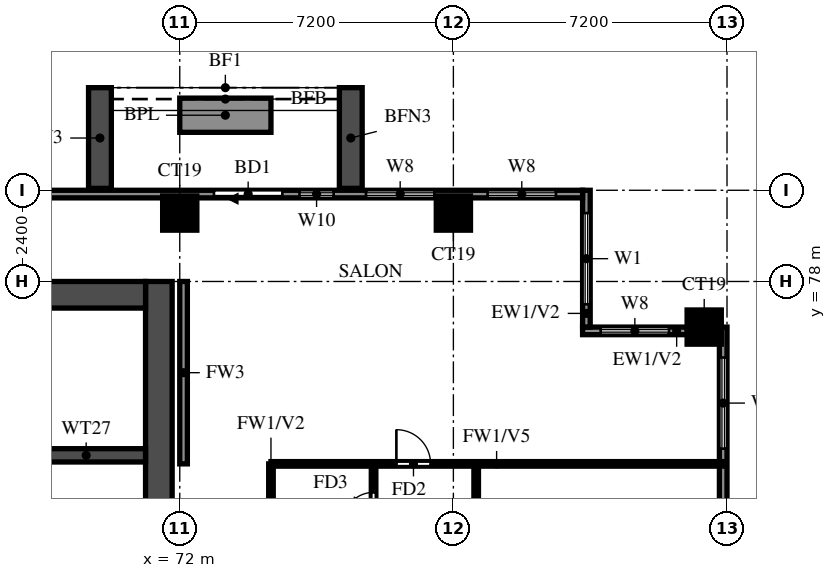
"""IFC4 building model, lengths in metres.
Left out: names, types, materials, properties, quantities, classifications, styles, units other than length and angle.
Written with IfcOpenShell. Run it as: python <this file> out.ifc"""

import sys

from ifc_helpers import new_model, si_unit, direction, frame, frame_2d, origin, origin_2d, place, context, subcontext, project, spatial, rectangle, extrude, source, transform, mapped, element, fill, save


model = new_model("IFC4")
c1 = context("Model", 3, precision=1e-05, world=origin(), true_north=direction((0.0, 1.0)))
c2 = subcontext(c1, "Body", "Model", "MODEL_VIEW")
j1 = project(units=[si_unit("LENGTHUNIT", "METRE"), si_unit("PLANEANGLEUNIT", "RADIAN")], contexts=[c1])
p1 = place(None, origin())
s1 = spatial("IfcSite", under=j1, at=p1, CompositionType="ELEMENT")
p2 = place(p1, origin())
s2 = spatial("IfcBuilding", under=s1, at=p2, CompositionType="ELEMENT")
p3 = place(p2, frame((0.0, 0.0, 120.0)))
s3 = spatial("IfcBuildingStorey", under=s2, at=p3, CompositionType="ELEMENT", Elevation=120.0)
m1 = source(origin(), c2, "Body", "SweptSolid", [
    extrude(rectangle(XDim=0.9, YDim=0.9, at=origin_2d()), origin(), (0.0, 0.0, 1.0), 3.2),
])
for number, where, z_axis, x_axis in (
    (1, (85.8, 76.8, 0.0), (0.0, 0.0, 1.0), (1.0, 0.0, 0.0)),
    (2, (72.0, 79.8, 0.0), (0.0, 0.0, 1.0), (1.0, 0.0, 0.0)),
    (3, (79.2, 79.8, 0.0), (0.0, 0.0, 1.0), (1.0, 0.0, 0.0)),
):
    element("IfcColumn", number, at=place(p3, frame(where, z_axis=z_axis, x_axis=x_axis)), inside=s3, PredefinedType="COLUMN", context=c2, shape_type="MappedRepresentation", body=[
        mapped(m1, transform((0.0, 0.0, 0.0))),
    ])
p4 = place(p3, frame((71.45, 66.1, 0.0), z_axis=(0.0, 0.0, 1.0), x_axis=(0.0, 1.0, 0.0)))
e4 = element("IfcWall", 4, at=p4, inside=s3, PredefinedType="SHEAR", context=c2, shape_type="SweptSolid", body=[
    extrude(rectangle(XDim=11.9, YDim=0.7, at=frame_2d((5.95, 0.0))), origin(), (0.0, 0.0, 1.0), 3.2),
])
p5 = place(p3, frame((29.7, 77.65, 0.0), z_axis=(0.0, 0.0, 1.0), x_axis=(1.0, 0.0, 0.0)))
e5 = element("IfcWall", 5, at=p5, inside=s3, PredefinedType="SHEAR", context=c2, shape_type="SweptSolid", body=[
    extrude(rectangle(XDim=41.4, YDim=0.7, at=frame_2d((20.7, 0.0))), origin(), (0.0, 0.0, 1.0), 3.2),
])
p6 = place(p3, frame((67.975, 73.425, 0.0), z_axis=(0.0, 0.0, 1.0), x_axis=(1.0, 0.0, 0.0)))
e6 = element("IfcWall", 6, at=p6, inside=s3, PredefinedType="SHEAR", context=c2, shape_type="SweptSolid", body=[
    extrude(rectangle(XDim=3.125, YDim=0.35, at=frame_2d((1.562, 0.0))), origin(), (0.0, 0.0, 1.0), 3.2),
])
p7 = place(p3, frame((86.3, 48.2, 0.0), z_axis=(0.0, 0.0, 1.0), x_axis=(0.0, 1.0, 0.0)))
e7 = element("IfcWall", 7, at=p7, inside=s3, PredefinedType="SOLIDWALL", context=c2, shape_type="SweptSolid", body=[
    extrude(rectangle(XDim=28.6, YDim=0.2, at=frame_2d((14.3, 0.0))), origin(), (0.0, 0.0, 1.0), 3.2),
])
p8 = place(p7, frame((7.9, 0.0, 0.0)))
e8 = element("IfcOpeningElement", 8, at=p8, cuts=e7, PredefinedType="OPENING", context=c2, shape_type="SweptSolid", body=[
    extrude(rectangle(XDim=1.8, YDim=2.4, at=frame_2d((0.9, 1.2))), frame((0.0, 0.11, 0.0), z_axis=(0.0, -1.0, 0.0), x_axis=(1.0, 0.0, 0.0)), (0.0, 0.0, 1.0), 0.22),
])
p9 = place(p7, frame((0.6, 0.0, 0.6)))
e9 = element("IfcOpeningElement", 9, at=p9, cuts=e7, PredefinedType="OPENING", context=c2, shape_type="SweptSolid", body=[
    extrude(rectangle(XDim=2.4, YDim=2.4, at=frame_2d((1.2, 1.2))), frame((0.0, 0.11, 0.0), z_axis=(0.0, -1.0, 0.0), x_axis=(1.0, 0.0, 0.0)), (0.0, 0.0, 1.0), 0.22),
])
p10 = place(p7, frame((3.55, 0.0, 0.6)))
e10 = element("IfcOpeningElement", 10, at=p10, cuts=e7, PredefinedType="OPENING", context=c2, shape_type="SweptSolid", body=[
    extrude(rectangle(XDim=0.9, YDim=2.4, at=frame_2d((0.45, 1.2))), frame((0.0, 0.11, 0.0), z_axis=(0.0, -1.0, 0.0), x_axis=(1.0, 0.0, 0.0)), (0.0, 0.0, 1.0), 0.22),
])
p11 = place(p7, frame((5.3, 0.0, 0.6)))
e11 = element("IfcOpeningElement", 11, at=p11, cuts=e7, PredefinedType="OPENING", context=c2, shape_type="SweptSolid", body=[
    extrude(rectangle(XDim=1.2, YDim=2.4, at=frame_2d((0.6, 1.2))), frame((0.0, 0.11, 0.0), z_axis=(0.0, -1.0, 0.0), x_axis=(1.0, 0.0, 0.0)), (0.0, 0.0, 1.0), 0.22),
])
p12 = place(p7, frame((11.9, 0.0, 0.6)))
e12 = element("IfcOpeningElement", 12, at=p12, cuts=e7, PredefinedType="OPENING", context=c2, shape_type="SweptSolid", body=[
    extrude(rectangle(XDim=1.8, YDim=2.4, at=frame_2d((0.9, 1.2))), frame((0.0, 0.11, 0.0), z_axis=(0.0, -1.0, 0.0), x_axis=(1.0, 0.0, 0.0)), (0.0, 0.0, 1.0), 0.22),
])
p13 = place(p7, frame((15.167, 0.0, 0.6)))
e13 = element("IfcOpeningElement", 13, at=p13, cuts=e7, PredefinedType="OPENING", context=c2, shape_type="SweptSolid", body=[
    extrude(rectangle(XDim=2.4, YDim=2.4, at=frame_2d((1.2, 1.2))), frame((0.0, 0.11, 0.0), z_axis=(0.0, -1.0, 0.0), x_axis=(1.0, 0.0, 0.0)), (0.0, 0.0, 1.0), 0.22),
])
p14 = place(p7, frame((18.033, 0.0, 0.6)))
e14 = element("IfcOpeningElement", 14, at=p14, cuts=e7, PredefinedType="OPENING", context=c2, shape_type="SweptSolid", body=[
    extrude(rectangle(XDim=2.4, YDim=2.4, at=frame_2d((1.2, 1.2))), frame((0.0, 0.11, 0.0), z_axis=(0.0, -1.0, 0.0), x_axis=(1.0, 0.0, 0.0)), (0.0, 0.0, 1.0), 0.22),
])
p15 = place(p7, frame((22.95, 0.0, 1.5)))
e15 = element("IfcOpeningElement", 15, at=p15, cuts=e7, PredefinedType="OPENING", context=c2, shape_type="SweptSolid", body=[
    extrude(rectangle(XDim=0.9, YDim=0.9, at=frame_2d((0.45, 0.45))), frame((0.0, 0.11, 0.0), z_axis=(0.0, -1.0, 0.0), x_axis=(1.0, 0.0, 0.0)), (0.0, 0.0, 1.0), 0.22),
])
p16 = place(p7, frame((25.4, 0.0, 0.6)))
e16 = element("IfcOpeningElement", 16, at=p16, cuts=e7, PredefinedType="OPENING", context=c2, shape_type="SweptSolid", body=[
    extrude(rectangle(XDim=2.4, YDim=2.4, at=frame_2d((1.2, 1.2))), frame((0.0, 0.11, 0.0), z_axis=(0.0, -1.0, 0.0), x_axis=(1.0, 0.0, 0.0)), (0.0, 0.0, 1.0), 0.22),
])
p17 = place(p3, frame((85.35, 76.7, 0.0), z_axis=(0.0, 0.0, 1.0), x_axis=(-1.0, 0.0, 0.0)))
e17 = element("IfcWall", 17, at=p17, inside=s3, PredefinedType="SOLIDWALL", context=c2, shape_type="SweptSolid", body=[
    extrude(rectangle(XDim=2.75, YDim=0.2, at=frame_2d((1.375, 0.0))), origin(), (0.0, 0.0, 1.0), 3.2),
])
p18 = place(p17, frame((0.475, 0.0, 0.6)))
e18 = element("IfcOpeningElement", 18, at=p18, cuts=e17, PredefinedType="OPENING", context=c2, shape_type="SweptSolid", body=[
    extrude(rectangle(XDim=1.8, YDim=2.4, at=frame_2d((0.9, 1.2))), frame((0.0, 0.11, 0.0), z_axis=(0.0, -1.0, 0.0), x_axis=(1.0, 0.0, 0.0)), (0.0, 0.0, 1.0), 0.22),
])
p19 = place(p3, frame((82.7, 76.8, 0.0), z_axis=(0.0, 0.0, 1.0), x_axis=(0.0, 1.0, 0.0)))
e19 = element("IfcWall", 19, at=p19, inside=s3, PredefinedType="SOLIDWALL", context=c2, shape_type="SweptSolid", body=[
    extrude(rectangle(XDim=3.6, YDim=0.2, at=frame_2d((1.8, 0.0))), origin(), (0.0, 0.0, 1.0), 3.2),
])
p20 = place(p19, frame((0.6, 0.0, 0.6)))
e20 = element("IfcOpeningElement", 20, at=p20, cuts=e19, PredefinedType="OPENING", context=c2, shape_type="SweptSolid", body=[
    extrude(rectangle(XDim=2.4, YDim=2.4, at=frame_2d((1.2, 1.2))), frame((0.0, 0.11, 0.0), z_axis=(0.0, -1.0, 0.0), x_axis=(1.0, 0.0, 0.0)), (0.0, 0.0, 1.0), 0.22),
])
p21 = place(p3, frame((82.6, 80.3, 0.0), z_axis=(0.0, 0.0, 1.0), x_axis=(-1.0, 0.0, 0.0)))
e21 = element("IfcWall", 21, at=p21, inside=s3, PredefinedType="SOLIDWALL", context=c2, shape_type="SweptSolid", body=[
    extrude(rectangle(XDim=64.6, YDim=0.2, at=frame_2d((32.3, 0.0))), origin(), (0.0, 0.0, 1.0), 3.2),
])
p22 = place(p21, frame((7.9, 0.0, 0.0)))
e22 = element("IfcOpeningElement", 22, at=p22, cuts=e21, PredefinedType="OPENING", context=c2, shape_type="SweptSolid", body=[
    extrude(rectangle(XDim=1.8, YDim=2.4, at=frame_2d((0.9, 1.2))), frame((0.0, 0.11, 0.0), z_axis=(0.0, -1.0, 0.0), x_axis=(1.0, 0.0, 0.0)), (0.0, 0.0, 1.0), 0.22),
])
p23 = place(p21, frame((54.767, 0.0, 0.6)))
e23 = element("IfcOpeningElement", 23, at=p23, cuts=e21, PredefinedType="OPENING", context=c2, shape_type="SweptSolid", body=[
    extrude(rectangle(XDim=2.4, YDim=2.4, at=frame_2d((1.2, 1.2))), frame((0.0, 0.11, 0.0), z_axis=(0.0, -1.0, 0.0), x_axis=(1.0, 0.0, 0.0)), (0.0, 0.0, 1.0), 0.22),
])
p24 = place(p21, frame((57.633, 0.0, 0.6)))
e24 = element("IfcOpeningElement", 24, at=p24, cuts=e21, PredefinedType="OPENING", context=c2, shape_type="SweptSolid", body=[
    extrude(rectangle(XDim=2.4, YDim=2.4, at=frame_2d((1.2, 1.2))), frame((0.0, 0.11, 0.0), z_axis=(0.0, -1.0, 0.0), x_axis=(1.0, 0.0, 0.0)), (0.0, 0.0, 1.0), 0.22),
])
p25 = place(p21, frame((62.0, 0.0, 0.6)))
e25 = element("IfcOpeningElement", 25, at=p25, cuts=e21, PredefinedType="OPENING", context=c2, shape_type="SweptSolid", body=[
    extrude(rectangle(XDim=1.8, YDim=2.4, at=frame_2d((0.9, 1.2))), frame((0.0, 0.11, 0.0), z_axis=(0.0, -1.0, 0.0), x_axis=(1.0, 0.0, 0.0)), (0.0, 0.0, 1.0), 0.22),
])
p26 = place(p21, frame((0.7, 0.0, 0.6)))
e26 = element("IfcOpeningElement", 26, at=p26, cuts=e21, PredefinedType="OPENING", context=c2, shape_type="SweptSolid", body=[
    extrude(rectangle(XDim=1.8, YDim=2.4, at=frame_2d((0.9, 1.2))), frame((0.0, 0.11, 0.0), z_axis=(0.0, -1.0, 0.0), x_axis=(1.0, 0.0, 0.0)), (0.0, 0.0, 1.0), 0.22),
])
p27 = place(p21, frame((3.9, 0.0, 0.6)))
e27 = element("IfcOpeningElement", 27, at=p27, cuts=e21, PredefinedType="OPENING", context=c2, shape_type="SweptSolid", body=[
    extrude(rectangle(XDim=1.8, YDim=2.4, at=frame_2d((0.9, 1.2))), frame((0.0, 0.11, 0.0), z_axis=(0.0, -1.0, 0.0), x_axis=(1.0, 0.0, 0.0)), (0.0, 0.0, 1.0), 0.22),
])
p28 = place(p21, frame((6.55, 0.0, 0.6)))
e28 = element("IfcOpeningElement", 28, at=p28, cuts=e21, PredefinedType="OPENING", context=c2, shape_type="SweptSolid", body=[
    extrude(rectangle(XDim=0.9, YDim=2.4, at=frame_2d((0.45, 1.2))), frame((0.0, 0.11, 0.0), z_axis=(0.0, -1.0, 0.0), x_axis=(1.0, 0.0, 0.0)), (0.0, 0.0, 1.0), 0.22),
])
for number, where, z_axis, x_axis in (
    (29, (76.5, 80.45, 0.0), (0.0, 0.0, 1.0), (0.0, 1.0, 0.0)),
    (30, (69.9, 80.45, 0.0), (0.0, 0.0, 1.0), (0.0, 1.0, 0.0)),
):
    element("IfcWall", number, at=place(p3, frame(where, z_axis=z_axis, x_axis=x_axis)), inside=s3, PredefinedType="SOLIDWALL", context=c2, shape_type="SweptSolid", body=[
        extrude(rectangle(XDim=2.65, YDim=0.6, at=frame_2d((1.325, 0.0))), origin(), (0.0, 0.0, 1.0), 2.85),
    ])
p29 = place(p3, frame((74.4, 82.375, 0.0), z_axis=(0.0, 0.0, 1.0), x_axis=(-1.0, 0.0, 0.0)))
e31 = element("IfcWall", 31, at=p29, inside=s3, PredefinedType="SOLIDWALL", context=c2, shape_type="SweptSolid", body=[
    extrude(rectangle(XDim=2.4, YDim=0.9, at=frame_2d((1.2, 0.0))), origin(), (0.0, 0.0, 1.0), 0.9),
])
p30 = place(p3, frame((72.1, 73.2, 0.0), z_axis=(0.0, 0.0, 1.0), x_axis=(0.0, 1.0, 0.0)))
e32 = element("IfcWall", 32, at=p30, inside=s3, PredefinedType="SOLIDWALL", context=c2, shape_type="SweptSolid", body=[
    extrude(rectangle(XDim=4.8, YDim=0.2, at=frame_2d((2.4, 0.0))), origin(), (0.0, 0.0, 1.0), 3.2),
])
p31 = place(p3, frame((74.4, 73.2, 0.0), z_axis=(0.0, 0.0, 1.0), x_axis=(1.0, 0.0, 0.0)))
e33 = element("IfcWall", 33, at=p31, inside=s3, PredefinedType="PARTITIONING", context=c2, shape_type="SweptSolid", body=[
    extrude(rectangle(XDim=11.875, YDim=0.12, at=frame_2d((5.938, 0.0))), origin(), (0.0, 0.0, 1.0), 2.3),
])
p32 = place(p31, frame((3.3, 0.0, 0.0)))
e34 = element("IfcOpeningElement", 34, at=p32, cuts=e33, PredefinedType="OPENING", context=c2, shape_type="SweptSolid", body=[
    extrude(rectangle(XDim=0.9, YDim=2.1, at=frame_2d((0.45, 1.05))), frame((0.0, 0.07, 0.0), z_axis=(0.0, -1.0, 0.0), x_axis=(1.0, 0.0, 0.0)), (0.0, 0.0, 1.0), 0.14),
])
p33 = place(p3, frame((74.4, 70.9, 0.0), z_axis=(0.0, 0.0, 1.0), x_axis=(0.0, 1.0, 0.0)))
e35 = element("IfcWall", 35, at=p33, inside=s3, PredefinedType="PARTITIONING", context=c2, shape_type="SweptSolid", body=[
    extrude(rectangle(XDim=2.3, YDim=0.12, at=frame_2d((1.15, 0.0))), origin(), (0.0, 0.0, 1.0), 3.2),
])
p34 = place(p3, frame((77.1, 61.2, 0.0), z_axis=(0.0, 0.0, 1.0), x_axis=(0.0, 1.0, 0.0)))
e36 = element("IfcWall", 36, at=p34, inside=s3, PredefinedType="PARTITIONING", context=c2, shape_type="SweptSolid", body=[
    extrude(rectangle(XDim=12.0, YDim=0.12, at=frame_2d((6.0, 0.0))), origin(), (0.0, 0.0, 1.0), 3.2),
])
p35 = place(p34, frame((4.2, 0.0, 0.0)))
e37 = element("IfcOpeningElement", 37, at=p35, cuts=e36, PredefinedType="OPENING", context=c2, shape_type="SweptSolid", body=[
    extrude(rectangle(XDim=0.9, YDim=2.1, at=frame_2d((0.45, 1.05))), frame((0.0, 0.07, 0.0), z_axis=(0.0, -1.0, 0.0), x_axis=(1.0, 0.0, 0.0)), (0.0, 0.0, 1.0), 0.14),
])
p36 = place(p34, frame((7.975, 0.0, 0.0)))
e38 = element("IfcOpeningElement", 38, at=p36, cuts=e36, PredefinedType="OPENING", context=c2, shape_type="SweptSolid", body=[
    extrude(rectangle(XDim=0.8, YDim=2.1, at=frame_2d((0.4, 1.05))), frame((0.0, 0.07, 0.0), z_axis=(0.0, -1.0, 0.0), x_axis=(1.0, 0.0, 0.0)), (0.0, 0.0, 1.0), 0.14),
])
p37 = place(p34, frame((10.45, 0.0, 0.0)))
e39 = element("IfcOpeningElement", 39, at=p37, cuts=e36, PredefinedType="OPENING", context=c2, shape_type="SweptSolid", body=[
    extrude(rectangle(XDim=0.8, YDim=2.1, at=frame_2d((0.4, 1.05))), frame((0.0, 0.07, 0.0), z_axis=(0.0, -1.0, 0.0), x_axis=(1.0, 0.0, 0.0)), (0.0, 0.0, 1.0), 0.14),
])
p38 = place(p3, frame((79.8, 69.6, 0.0), z_axis=(0.0, 0.0, 1.0), x_axis=(0.0, 1.0, 0.0)))
e40 = element("IfcWall", 40, at=p38, inside=s3, PredefinedType="PARTITIONING", context=c2, shape_type="SweptSolid", body=[
    extrude(rectangle(XDim=3.6, YDim=0.12, at=frame_2d((1.8, 0.0))), origin(), (0.0, 0.0, 1.0), 3.2),
])
p39 = place(p16, origin())
e41 = element("IfcWindow", 41, at=p39, inside=s3, PartitioningType="DOUBLE_PANEL_VERTICAL", PredefinedType="WINDOW", context=c2, shape_type="SweptSolid", body=[
    extrude(rectangle(XDim=2.4, YDim=2.4, at=frame_2d((1.2, 1.2))), frame((0.0, 0.03, 0.0), z_axis=(0.0, -1.0, 0.0), x_axis=(1.0, 0.0, 0.0)), (0.0, 0.0, 1.0), 0.06),
])
fill(e16, e41)
p40 = place(p18, origin())
e42 = element("IfcWindow", 42, at=p40, inside=s3, PartitioningType="DOUBLE_PANEL_VERTICAL", PredefinedType="WINDOW", context=c2, shape_type="SweptSolid", body=[
    extrude(rectangle(XDim=1.8, YDim=2.4, at=frame_2d((0.9, 1.2))), frame((0.0, 0.03, 0.0), z_axis=(0.0, -1.0, 0.0), x_axis=(1.0, 0.0, 0.0)), (0.0, 0.0, 1.0), 0.06),
])
fill(e18, e42)
p41 = place(p20, origin())
e43 = element("IfcWindow", 43, at=p41, inside=s3, PartitioningType="DOUBLE_PANEL_VERTICAL", PredefinedType="WINDOW", context=c2, shape_type="SweptSolid", body=[
    extrude(rectangle(XDim=2.4, YDim=2.4, at=frame_2d((1.2, 1.2))), frame((0.0, 0.03, 0.0), z_axis=(0.0, -1.0, 0.0), x_axis=(1.0, 0.0, 0.0)), (0.0, 0.0, 1.0), 0.06),
])
fill(e20, e43)
p42 = place(p22, origin())
e44 = element("IfcDoor", 44, at=p42, inside=s3, OperationType="DOUBLE_DOOR_SLIDING", PredefinedType="DOOR", context=c2, shape_type="SweptSolid", body=[
    extrude(rectangle(XDim=1.8, YDim=2.4, at=frame_2d((0.9, 1.2))), frame((0.0, 0.025, 0.0), z_axis=(0.0, -1.0, 0.0), x_axis=(1.0, 0.0, 0.0)), (0.0, 0.0, 1.0), 0.05),
])
fill(e22, e44)
p43 = place(p26, origin())
e45 = element("IfcWindow", 45, at=p43, inside=s3, PartitioningType="DOUBLE_PANEL_VERTICAL", PredefinedType="WINDOW", context=c2, shape_type="SweptSolid", body=[
    extrude(rectangle(XDim=1.8, YDim=2.4, at=frame_2d((0.9, 1.2))), frame((0.0, 0.03, 0.0), z_axis=(0.0, -1.0, 0.0), x_axis=(1.0, 0.0, 0.0)), (0.0, 0.0, 1.0), 0.06),
])
fill(e26, e45)
p44 = place(p27, origin())
e46 = element("IfcWindow", 46, at=p44, inside=s3, PartitioningType="DOUBLE_PANEL_VERTICAL", PredefinedType="WINDOW", context=c2, shape_type="SweptSolid", body=[
    extrude(rectangle(XDim=1.8, YDim=2.4, at=frame_2d((0.9, 1.2))), frame((0.0, 0.03, 0.0), z_axis=(0.0, -1.0, 0.0), x_axis=(1.0, 0.0, 0.0)), (0.0, 0.0, 1.0), 0.06),
])
fill(e27, e46)
p45 = place(p28, origin())
e47 = element("IfcWindow", 47, at=p45, inside=s3, PartitioningType="SINGLE_PANEL", PredefinedType="WINDOW", context=c2, shape_type="SweptSolid", body=[
    extrude(rectangle(XDim=0.9, YDim=2.4, at=frame_2d((0.45, 1.2))), frame((0.0, 0.03, 0.0), z_axis=(0.0, -1.0, 0.0), x_axis=(1.0, 0.0, 0.0)), (0.0, 0.0, 1.0), 0.06),
])
fill(e28, e47)
p46 = place(p32, origin())
e48 = element("IfcDoor", 48, at=p46, inside=s3, OperationType="SINGLE_SWING_RIGHT", PredefinedType="DOOR", context=c2, shape_type="SweptSolid", body=[
    extrude(rectangle(XDim=0.9, YDim=2.1, at=frame_2d((0.45, 1.05))), frame((0.0, 0.025, 0.0), z_axis=(0.0, -1.0, 0.0), x_axis=(1.0, 0.0, 0.0)), (0.0, 0.0, 1.0), 0.05),
])
fill(e34, e48)
p47 = place(p37, origin())
e49 = element("IfcDoor", 49, at=p47, inside=s3, OperationType="SINGLE_SWING_LEFT", PredefinedType="DOOR", context=c2, shape_type="SweptSolid", body=[
    extrude(rectangle(XDim=0.8, YDim=2.1, at=frame_2d((0.4, 1.05))), frame((0.0, 0.025, 0.0), z_axis=(0.0, -1.0, 0.0), x_axis=(1.0, 0.0, 0.0)), (0.0, 0.0, 1.0), 0.05),
])
fill(e39, e49)
save(model, sys.argv[1])
